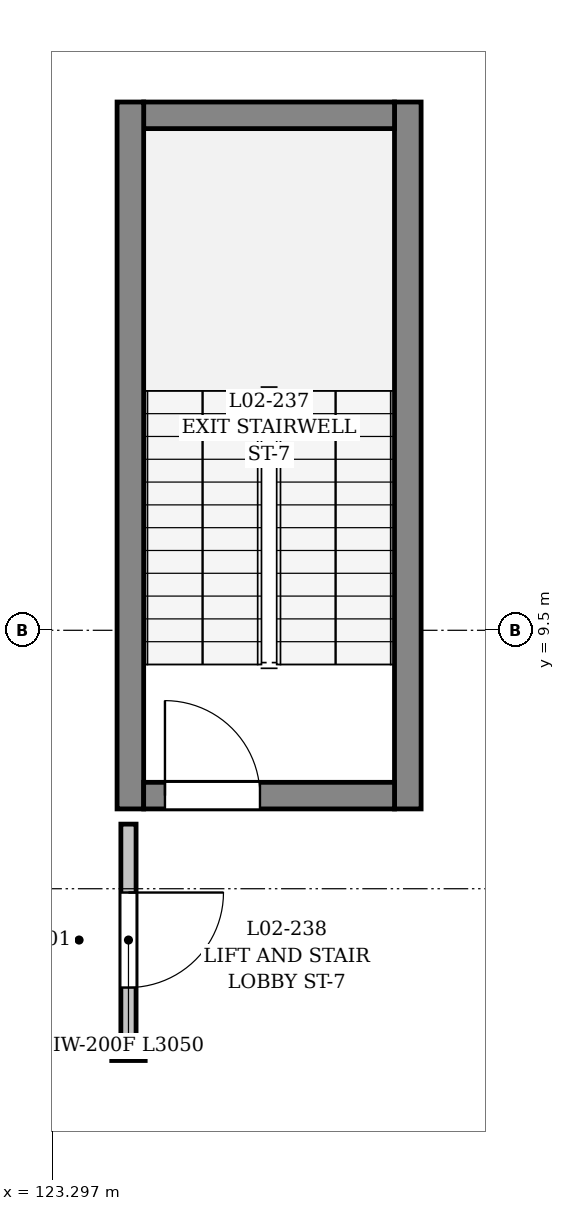
"""IFC4 building model, lengths in metres.
Left out: names, types, materials, properties, quantities, classifications, styles, units other than length and angle.
Written with IfcOpenShell. Run it as: python <this file> out.ifc"""

import sys

from ifc_helpers import new_model, si_unit, direction, frame, frame_2d, origin, place, context, subcontext, project, spatial, rectangle, extrude, element, fill, save


model = new_model("IFC4")
c1 = context("Model", 3, precision=1e-05, world=origin(), true_north=direction((0.0, 1.0)))
c2 = subcontext(c1, "Body", "Model", "MODEL_VIEW")
j1 = project(units=[si_unit("LENGTHUNIT", "METRE"), si_unit("PLANEANGLEUNIT", "RADIAN")], contexts=[c1])
p1 = place(None, origin())
s1 = spatial("IfcSite", under=j1, at=p1, CompositionType="ELEMENT")
p2 = place(p1, origin())
s2 = spatial("IfcBuilding", under=s1, at=p2, CompositionType="ELEMENT")
p3 = place(p2, frame((0.0, 0.0, 5.4)))
s3 = spatial("IfcBuildingStorey", under=s2, at=p3, CompositionType="ELEMENT", Elevation=5.4)
p4 = place(p3, frame((127.975, 7.15, 0.0), z_axis=(0.0, 0.0, 1.0), x_axis=(0.0, 1.0, 0.0)))
e1 = element("IfcWall", 1, at=p4, inside=s3, PredefinedType="SHEAR", context=c2, shape_type="SweptSolid", body=[
    extrude(rectangle(XDim=9.3, YDim=0.35, at=frame_2d((4.65, 0.0))), origin(), (0.0, 0.0, 1.0), 4.52),
])
p5 = place(p3, frame((127.8, 16.275, 0.0), z_axis=(0.0, 0.0, 1.0), x_axis=(-1.0, 0.0, 0.0)))
e2 = element("IfcWall", 2, at=p5, inside=s3, PredefinedType="SHEAR", context=c2, shape_type="SweptSolid", body=[
    extrude(rectangle(XDim=3.3, YDim=0.35, at=frame_2d((1.65, 0.0))), origin(), (0.0, 0.0, 1.0), 4.52),
])
p6 = place(p3, frame((124.325, 16.45, 0.0), z_axis=(0.0, 0.0, 1.0), x_axis=(0.0, -1.0, 0.0)))
e3 = element("IfcWall", 3, at=p6, inside=s3, PredefinedType="SHEAR", context=c2, shape_type="SweptSolid", body=[
    extrude(rectangle(XDim=9.3, YDim=0.35, at=frame_2d((4.65, 0.0))), origin(), (0.0, 0.0, 1.0), 4.52),
])
p7 = place(p3, frame((124.5, 7.325, 0.0), z_axis=(0.0, 0.0, 1.0), x_axis=(1.0, 0.0, 0.0)))
e4 = element("IfcWall", 4, at=p7, inside=s3, PredefinedType="SHEAR", context=c2, shape_type="SweptSolid", body=[
    extrude(rectangle(XDim=3.3, YDim=0.35, at=frame_2d((1.65, 0.0))), origin(), (0.0, 0.0, 1.0), 4.52),
])
p8 = place(p7, frame((0.28, 0.0, 0.0)))
e5 = element("IfcOpeningElement", 5, at=p8, cuts=e4, PredefinedType="OPENING", context=c2, shape_type="SweptSolid", body=[
    extrude(rectangle(XDim=1.25, YDim=2.2, at=frame_2d((0.625, 1.1))), frame((0.0, 0.185, 0.0), z_axis=(0.0, -1.0, 0.0), x_axis=(1.0, 0.0, 0.0)), (0.0, 0.0, 1.0), 0.37),
])
p9 = place(p3, frame((124.3, 6.95, 0.0), z_axis=(0.0, 0.0, 1.0), x_axis=(0.0, -1.0, 0.0)))
e6 = element("IfcWall", 6, at=p9, inside=s3, PredefinedType="PARTITIONING", context=c2, shape_type="SweptSolid", body=[
    extrude(rectangle(XDim=3.05, YDim=0.2, at=frame_2d((1.525, 0.0))), origin(), (0.0, 0.0, 1.0), 4.52),
])
p10 = place(p9, frame((0.9, 0.0, 0.0)))
e7 = element("IfcOpeningElement", 7, at=p10, cuts=e6, PredefinedType="OPENING", context=c2, shape_type="SweptSolid", body=[
    extrude(rectangle(XDim=1.25, YDim=2.2, at=frame_2d((0.625, 1.1))), frame((0.0, 0.11, 0.0), z_axis=(0.0, -1.0, 0.0), x_axis=(1.0, 0.0, 0.0)), (0.0, 0.0, 1.0), 0.22),
])
p11 = place(p3, frame((124.08, 3.9, 0.0), z_axis=(0.0, 0.0, 1.0), x_axis=(1.0, 0.0, 0.0)))
e8 = element("IfcWall", 8, at=p11, inside=s3, PredefinedType="PARTITIONING", context=c2, shape_type="SweptSolid", body=[
    extrude(rectangle(XDim=0.44, YDim=0.12, at=frame_2d((0.22, 0.0))), origin(), (0.0, 0.0, 1.0), 4.52),
])
p12 = place(p8, origin())
e9 = element("IfcDoor", 9, at=p12, inside=s3, OperationType="SINGLE_SWING_LEFT", PredefinedType="DOOR", context=c2, shape_type="SweptSolid", body=[
    extrude(rectangle(XDim=1.25, YDim=2.2, at=frame_2d((0.625, 1.1))), frame((0.0, 0.025, 0.0), z_axis=(0.0, -1.0, 0.0), x_axis=(1.0, 0.0, 0.0)), (0.0, 0.0, 1.0), 0.05),
])
fill(e5, e9)
p13 = place(p10, origin())
e10 = element("IfcDoor", 10, at=p13, inside=s3, OperationType="SINGLE_SWING_LEFT", PredefinedType="DOOR", context=c2, shape_type="SweptSolid", body=[
    extrude(rectangle(XDim=1.25, YDim=2.2, at=frame_2d((0.625, 1.1))), frame((0.0, 0.025, 0.0), z_axis=(0.0, -1.0, 0.0), x_axis=(1.0, 0.0, 0.0)), (0.0, 0.0, 1.0), 0.05),
])
fill(e7, e10)
save(model, sys.argv[1])
